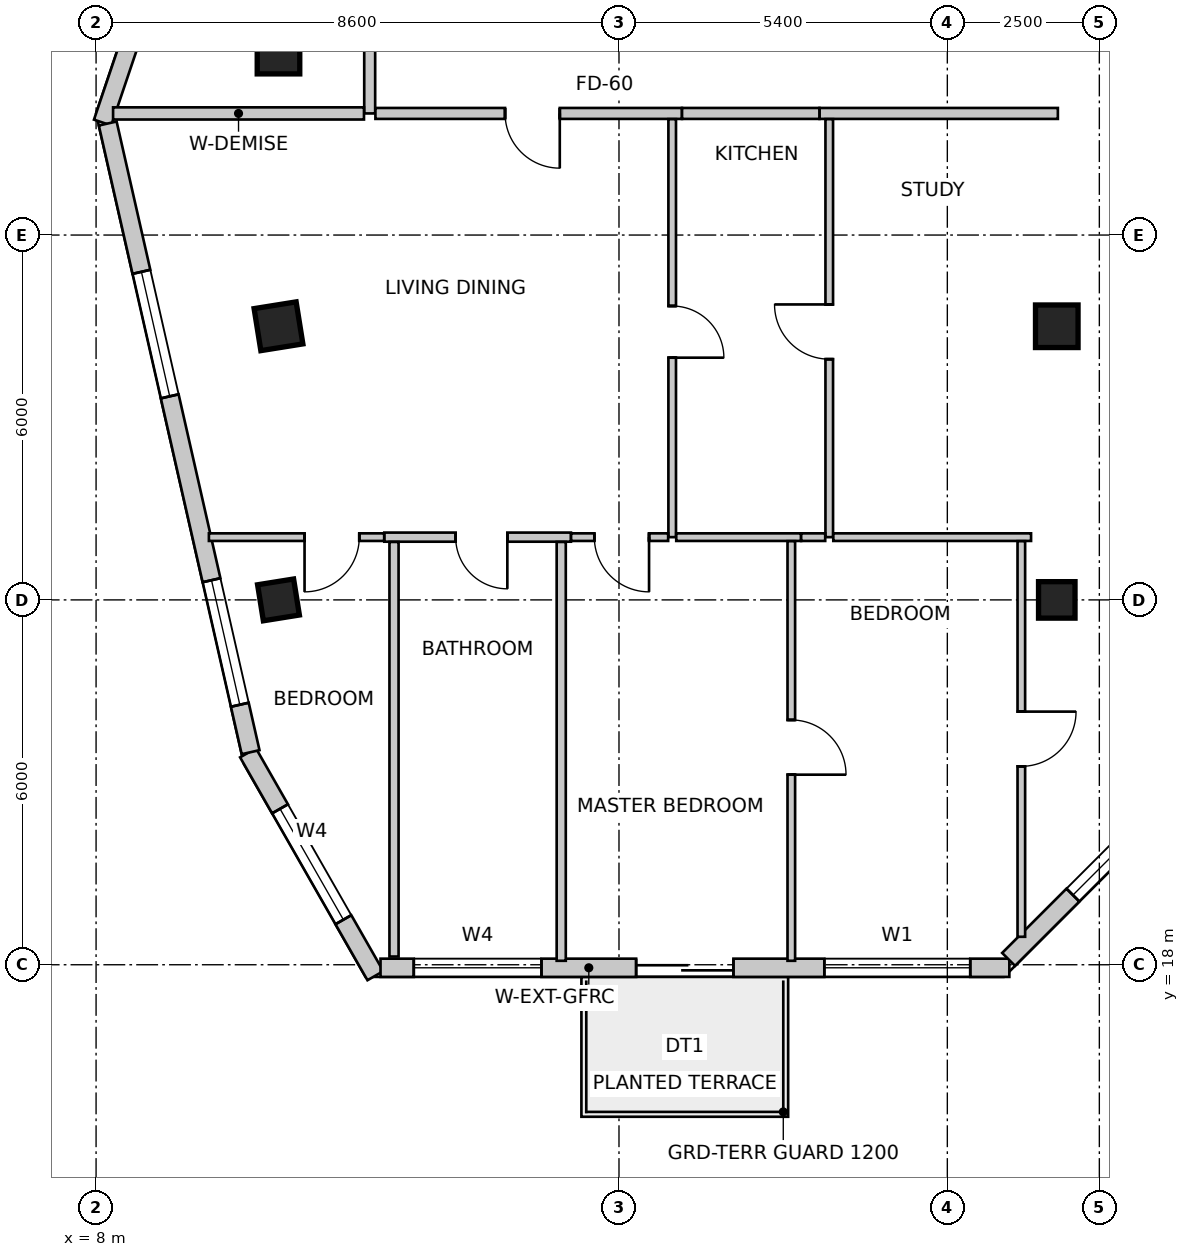
"""IFC4 building model, lengths in metres.
Left out: names, types, materials, properties, quantities, classifications, styles, units other than length and angle.
Written with IfcOpenShell. Run it as: python <this file> out.ifc"""

import sys

from ifc_helpers import new_model, si_unit, direction, frame, frame_2d, origin, origin_2d, place, context, subcontext, project, spatial, rectangle, extrude, source, transform, mapped, element, fill, save


model = new_model("IFC4")
c1 = context("Model", 3, precision=1e-05, world=origin(), true_north=direction((0.0, 1.0)))
c2 = subcontext(c1, "Body", "Model", "MODEL_VIEW")
j1 = project(units=[si_unit("LENGTHUNIT", "METRE"), si_unit("PLANEANGLEUNIT", "RADIAN")], contexts=[c1])
p1 = place(None, origin())
s1 = spatial("IfcSite", under=j1, at=p1, CompositionType="ELEMENT")
p2 = place(p1, origin())
s2 = spatial("IfcBuilding", under=s1, at=p2, CompositionType="ELEMENT")
p3 = place(p2, frame((0.0, 0.0, 252.9)))
s3 = spatial("IfcBuildingStorey", under=s2, at=p3, CompositionType="ELEMENT", Elevation=252.9)
m1 = source(origin(), c2, "Body", "SweptSolid", [
    extrude(rectangle(XDim=0.7, YDim=0.7, at=origin_2d()), origin(), (0.0, 0.0, 1.0), 3.6),
])
for number, where, z_axis, x_axis in (
    (1, (11.0, 33.0, 0.0), (0.0, 0.0, 1.0), (1.0, 0.0, 0.0)),
    (2, (11.0, 28.5, 0.0), (0.0, 0.0, 1.0), (0.158, -0.987, 0.0)),
):
    element("IfcColumn", number, at=place(p3, frame(where, z_axis=z_axis, x_axis=x_axis)), inside=s3, PredefinedType="COLUMN", context=c2, shape_type="MappedRepresentation", body=[
        mapped(m1, transform((0.0, 0.0, 0.0), scale=1.0)),
    ])
m2 = source(origin(), c2, "Body", "SweptSolid", [
    extrude(rectangle(XDim=0.6, YDim=0.6, at=origin_2d()), origin(), (0.0, 0.0, 1.0), 3.6),
])
p4 = place(p3, frame((11.0, 24.0, 0.0), z_axis=(0.0, 0.0, 1.0), x_axis=(0.158158067254, -0.987413806751, 0.0)))
e3 = element("IfcColumn", 3, at=p4, inside=s3, PredefinedType="COLUMN", context=c2, shape_type="MappedRepresentation", body=[
    mapped(m2, transform((0.0, 0.0, 0.0), scale=1.0)),
])
p5 = place(p3, frame((23.8, 28.5, 0.0), z_axis=(0.0, 0.0, 1.0), x_axis=(1.0, 0.0, 0.0)))
e4 = element("IfcColumn", 4, at=p5, inside=s3, PredefinedType="COLUMN", context=c2, shape_type="MappedRepresentation", body=[
    mapped(m1, transform((0.0, 0.0, 0.0), scale=1.0)),
])
p6 = place(p3, frame((23.8, 24.0, 0.0), z_axis=(0.0, 0.0, 1.0), x_axis=(1.0, 0.0, 0.0)))
e5 = element("IfcColumn", 5, at=p6, inside=s3, PredefinedType="COLUMN", context=c2, shape_type="MappedRepresentation", body=[
    mapped(m2, transform((0.0, 0.0, 0.0), scale=1.0)),
])
p7 = place(p3, frame((10.499, 21.485, 0.0), z_axis=(0.0, 0.0, 1.0), x_axis=(0.496163848656, -0.868228907194, 0.0)))
e6 = element("IfcWall", 6, at=p7, inside=s3, PredefinedType="SOLIDWALL", context=c2, shape_type="SweptSolid", body=[
    extrude(rectangle(XDim=4.222, YDim=0.3, at=frame_2d((2.111, 0.0))), origin(), (0.0, 0.0, 1.0), 3.35),
])
m3 = source(origin(), c2, "Body", "SweptSolid", [
    extrude(rectangle(XDim=2.1, YDim=2.0, at=frame_2d((1.05, 1.0))), frame((0.0, 0.16, 0.0), z_axis=(0.0, -1.0, 0.0), x_axis=(1.0, 0.0, 0.0)), (0.0, 0.0, 1.0), 0.32),
])
p8 = place(p7, frame((1.061, 0.0, 0.85)))
e7 = element("IfcOpeningElement", 7, at=p8, cuts=e6, PredefinedType="OPENING", context=c2, shape_type="MappedRepresentation", body=[
    mapped(m3, transform((0.0, 0.0, 0.0), scale=1.0)),
])
p9 = place(p3, frame((12.678, 17.95, 0.0), z_axis=(0.0, 0.0, 1.0), x_axis=(1.0, 0.0, 0.0)))
e8 = element("IfcWall", 8, at=p9, inside=s3, PredefinedType="SOLIDWALL", context=c2, shape_type="SweptSolid", body=[
    extrude(rectangle(XDim=10.342, YDim=0.3, at=frame_2d((5.171, 0.0))), origin(), (0.0, 0.0, 1.0), 3.35),
])
m4 = source(origin(), c2, "Body", "SweptSolid", [
    extrude(rectangle(XDim=1.6, YDim=2.15, at=frame_2d((0.8, 1.075))), frame((0.0, 0.16, 0.0), z_axis=(0.0, -1.0, 0.0), x_axis=(1.0, 0.0, 0.0)), (0.0, 0.0, 1.0), 0.32),
])
p10 = place(p9, frame((4.204, 0.0, 0.0)))
e9 = element("IfcOpeningElement", 9, at=p10, cuts=e8, PredefinedType="OPENING", context=c2, shape_type="MappedRepresentation", body=[
    mapped(m4, transform((0.0, 0.0, 0.0), scale=1.0)),
])
p11 = place(p9, frame((0.547, 0.0, 0.85)))
e10 = element("IfcOpeningElement", 10, at=p11, cuts=e8, PredefinedType="OPENING", context=c2, shape_type="MappedRepresentation", body=[
    mapped(m3, transform((0.0, 0.0, 0.0), scale=1.0)),
])
m5 = source(origin(), c2, "Body", "SweptSolid", [
    extrude(rectangle(XDim=2.4, YDim=2.2, at=frame_2d((1.2, 1.1))), frame((0.0, 0.16, 0.0), z_axis=(0.0, -1.0, 0.0), x_axis=(1.0, 0.0, 0.0)), (0.0, 0.0, 1.0), 0.32),
])
p12 = place(p9, frame((7.299, 0.0, 0.85)))
e11 = element("IfcOpeningElement", 11, at=p12, cuts=e8, PredefinedType="OPENING", context=c2, shape_type="MappedRepresentation", body=[
    mapped(m5, transform((0.0, 0.0, 0.0), scale=1.0)),
])
p13 = place(p3, frame((23.008, 18.088, 0.0), z_axis=(0.0, 0.0, 1.0), x_axis=(0.707106781187, 0.707106781187, 0.0)))
e12 = element("IfcWall", 12, at=p13, inside=s3, PredefinedType="SOLIDWALL", context=c2, shape_type="SweptSolid", body=[
    extrude(rectangle(XDim=4.781, YDim=0.3, at=frame_2d((2.39, 0.0))), origin(), (0.0, 0.0, 1.0), 3.35),
])
p14 = place(p13, frame((1.496, 0.0, 0.85)))
e13 = element("IfcOpeningElement", 13, at=p14, cuts=e12, PredefinedType="OPENING", context=c2, shape_type="MappedRepresentation", body=[
    mapped(m3, transform((0.0, 0.0, 0.0), scale=1.0)),
])
p15 = place(p3, frame((13.269, 47.134, 0.0), z_axis=(0.0, 0.0, 1.0), x_axis=(-0.3199211297, -0.947444178182, 0.0)))
e14 = element("IfcWall", 14, at=p15, inside=s3, PredefinedType="SOLIDWALL", context=c2, shape_type="SweptSolid", body=[
    extrude(rectangle(XDim=16.132, YDim=0.3, at=frame_2d((8.066, 0.0))), origin(), (0.0, 0.0, 1.0), 3.35),
])
p16 = place(p15, frame((2.435, 0.0, 0.85)))
e15 = element("IfcOpeningElement", 15, at=p16, cuts=e14, PredefinedType="OPENING", context=c2, shape_type="MappedRepresentation", body=[
    mapped(m5, transform((0.0, 0.0, 0.0), scale=1.0)),
])
p17 = place(p15, frame((7.417, 0.0, 0.85)))
e16 = element("IfcOpeningElement", 16, at=p17, cuts=e14, PredefinedType="OPENING", context=c2, shape_type="MappedRepresentation", body=[
    mapped(m3, transform((0.0, 0.0, 0.0), scale=1.0)),
])
p18 = place(p15, frame((12.099, 0.0, 0.85)))
e17 = element("IfcOpeningElement", 17, at=p18, cuts=e14, PredefinedType="OPENING", context=c2, shape_type="MappedRepresentation", body=[
    mapped(m5, transform((0.0, 0.0, 0.0), scale=1.0)),
])
p19 = place(p3, frame((8.191, 31.834, 0.0), z_axis=(0.0, 0.0, 1.0), x_axis=(0.221636032737, -0.975129462683, 0.0)))
e18 = element("IfcWall", 18, at=p19, inside=s3, PredefinedType="SOLIDWALL", context=c2, shape_type="SweptSolid", body=[
    extrude(rectangle(XDim=10.602, YDim=0.3, at=frame_2d((5.301, 0.0))), origin(), (0.0, 0.0, 1.0), 3.35),
])
p20 = place(p19, frame((2.501, 0.0, 0.85)))
e19 = element("IfcOpeningElement", 19, at=p20, cuts=e18, PredefinedType="OPENING", context=c2, shape_type="MappedRepresentation", body=[
    mapped(m3, transform((0.0, 0.0, 0.0), scale=1.0)),
])
p21 = place(p19, frame((7.702, 0.0, 0.85)))
e20 = element("IfcOpeningElement", 20, at=p21, cuts=e18, PredefinedType="OPENING", context=c2, shape_type="MappedRepresentation", body=[
    mapped(m3, transform((0.0, 0.0, 0.0), scale=1.0)),
])
p22 = place(p3, frame((12.5, 32.0, 0.0), z_axis=(0.0, 0.0, 1.0), x_axis=(0.0, 1.0, 0.0)))
e21 = element("IfcWall", 21, at=p22, inside=s3, PredefinedType="PARTITIONING", context=c2, shape_type="SweptSolid", body=[
    extrude(rectangle(XDim=1.556, YDim=0.18, at=frame_2d((0.778, 0.0))), origin(), (0.0, 0.0, 1.0), 3.019),
])
p23 = place(p3, frame((23.818, 32.0, 0.0), z_axis=(0.0, 0.0, 1.0), x_axis=(-1.0, 0.0, 0.0)))
e22 = element("IfcWall", 22, at=p23, inside=s3, PredefinedType="PARTITIONING", context=c2, shape_type="SweptSolid", body=[
    extrude(rectangle(XDim=3.92, YDim=0.18, at=frame_2d((1.96, 0.0))), origin(), (0.0, 0.0, 1.0), 3.019),
])
p24 = place(p3, frame((17.635, 32.0, 0.0), z_axis=(0.0, 0.0, 1.0), x_axis=(-1.0, 0.0, 0.0)))
e23 = element("IfcWall", 23, at=p24, inside=s3, PredefinedType="PARTITIONING", context=c2, shape_type="SweptSolid", body=[
    extrude(rectangle(XDim=5.041, YDim=0.18, at=frame_2d((2.521, 0.0))), origin(), (0.0, 0.0, 1.0), 3.019),
])
m6 = source(origin(), c2, "Body", "SweptSolid", [
    extrude(rectangle(XDim=0.9, YDim=2.15, at=frame_2d((0.45, 1.075))), frame((0.0, 0.1, 0.0), z_axis=(0.0, -1.0, 0.0), x_axis=(1.0, 0.0, 0.0)), (0.0, 0.0, 1.0), 0.2),
])
p25 = place(p24, frame((2.009, 0.0, 0.0)))
e24 = element("IfcOpeningElement", 24, at=p25, cuts=e23, PredefinedType="OPENING", context=c2, shape_type="MappedRepresentation", body=[
    mapped(m6, transform((0.0, 0.0, 0.0), scale=1.0)),
])
p26 = place(p3, frame((19.896, 32.0, 0.0), z_axis=(0.0, 0.0, 1.0), x_axis=(-1.0, 0.0, 0.0)))
e25 = element("IfcWall", 25, at=p26, inside=s3, PredefinedType="PARTITIONING", context=c2, shape_type="SweptSolid", body=[
    extrude(rectangle(XDim=2.259, YDim=0.18, at=frame_2d((1.129, 0.0))), origin(), (0.0, 0.0, 1.0), 3.35),
])
p27 = place(p3, frame((12.406, 32.0, 0.0), z_axis=(0.0, 0.0, 1.0), x_axis=(-1.0, 0.0, 0.0)))
e26 = element("IfcWall", 26, at=p27, inside=s3, PredefinedType="PARTITIONING", context=c2, shape_type="SweptSolid", body=[
    extrude(rectangle(XDim=4.126, YDim=0.2, at=frame_2d((2.063, 0.0))), origin(), (0.0, 0.0, 1.0), 2.642),
])
p28 = place(p3, frame((20.058, 25.032, 0.0), z_axis=(0.0, 0.0, 1.0), x_axis=(0.0, 1.0, 0.0)))
e27 = element("IfcWall", 27, at=p28, inside=s3, PredefinedType="PARTITIONING", context=c2, shape_type="SweptSolid", body=[
    extrude(rectangle(XDim=6.874, YDim=0.125, at=frame_2d((3.437, 0.0))), origin(), (0.0, 0.0, 1.0), 2.879),
])
m7 = source(origin(), c2, "Body", "SweptSolid", [
    extrude(rectangle(XDim=0.9, YDim=2.15, at=frame_2d((0.45, 1.075))), frame((0.0, 0.073, 0.0), z_axis=(0.0, -1.0, 0.0), x_axis=(1.0, 0.0, 0.0)), (0.0, 0.0, 1.0), 0.145),
])
p29 = place(p28, frame((2.927, 0.0, 0.0)))
e28 = element("IfcOpeningElement", 28, at=p29, cuts=e27, PredefinedType="OPENING", context=c2, shape_type="MappedRepresentation", body=[
    mapped(m7, transform((0.0, 0.0, 0.0), scale=1.0)),
])
p30 = place(p3, frame((23.377, 25.032, 0.0), z_axis=(0.0, 0.0, 1.0), x_axis=(-1.0, 0.0, 0.0)))
e29 = element("IfcWall", 29, at=p30, inside=s3, PredefinedType="PARTITIONING", context=c2, shape_type="SweptSolid", body=[
    extrude(rectangle(XDim=3.252, YDim=0.125, at=frame_2d((1.626, 0.0))), origin(), (0.0, 0.0, 1.0), 3.019),
])
p31 = place(p3, frame((17.475, 31.906, 0.0), z_axis=(0.0, 0.0, 1.0), x_axis=(0.0, -1.0, 0.0)))
e30 = element("IfcWall", 30, at=p31, inside=s3, PredefinedType="PARTITIONING", context=c2, shape_type="SweptSolid", body=[
    extrude(rectangle(XDim=6.874, YDim=0.125, at=frame_2d((3.437, 0.0))), origin(), (0.0, 0.0, 1.0), 2.879),
])
m8 = source(origin(), c2, "Body", "SweptSolid", [
    extrude(rectangle(XDim=0.85, YDim=2.15, at=frame_2d((0.425, 1.075))), frame((0.0, 0.073, 0.0), z_axis=(0.0, -1.0, 0.0), x_axis=(1.0, 0.0, 0.0)), (0.0, 0.0, 1.0), 0.145),
])
p32 = place(p31, frame((3.073, 0.0, 0.0)))
e31 = element("IfcOpeningElement", 31, at=p32, cuts=e30, PredefinedType="OPENING", context=c2, shape_type="MappedRepresentation", body=[
    mapped(m8, transform((0.0, 0.0, 0.0), scale=1.0)),
])
p33 = place(p3, frame((15.81, 25.032, 0.0), z_axis=(0.0, 0.0, 1.0), x_axis=(-1.0, 0.0, 0.0)))
e32 = element("IfcWall", 32, at=p33, inside=s3, PredefinedType="PARTITIONING", context=c2, shape_type="SweptSolid", body=[
    extrude(rectangle(XDim=3.07, YDim=0.15, at=frame_2d((1.535, 0.0))), origin(), (0.0, 0.0, 1.0), 2.879),
])
m9 = source(origin(), c2, "Body", "SweptSolid", [
    extrude(rectangle(XDim=0.85, YDim=2.15, at=frame_2d((0.425, 1.075))), frame((0.0, 0.085, 0.0), z_axis=(0.0, -1.0, 0.0), x_axis=(1.0, 0.0, 0.0)), (0.0, 0.0, 1.0), 0.17),
])
p34 = place(p33, frame((1.046, 0.0, 0.0)))
e33 = element("IfcOpeningElement", 33, at=p34, cuts=e32, PredefinedType="OPENING", context=c2, shape_type="MappedRepresentation", body=[
    mapped(m9, transform((0.0, 0.0, 0.0), scale=1.0)),
])
p35 = place(p3, frame((12.738, 25.032, 0.0), z_axis=(0.0, 0.0, 1.0), x_axis=(-1.0, 0.0, 0.0)))
e34 = element("IfcWall", 34, at=p35, inside=s3, PredefinedType="PARTITIONING", context=c2, shape_type="SweptSolid", body=[
    extrude(rectangle(XDim=2.883, YDim=0.125, at=frame_2d((1.441, 0.0))), origin(), (0.0, 0.0, 1.0), 2.642),
])
p36 = place(p35, frame((0.409, 0.0, 0.0)))
e35 = element("IfcOpeningElement", 35, at=p36, cuts=e34, PredefinedType="OPENING", context=c2, shape_type="MappedRepresentation", body=[
    mapped(m7, transform((0.0, 0.0, 0.0), scale=1.0)),
])
p37 = place(p3, frame((17.408, 25.032, 0.0), z_axis=(0.0, 0.0, 1.0), x_axis=(-1.0, 0.0, 0.0)))
e36 = element("IfcWall", 36, at=p37, inside=s3, PredefinedType="PARTITIONING", context=c2, shape_type="SweptSolid", body=[
    extrude(rectangle(XDim=1.596, YDim=0.125, at=frame_2d((0.798, 0.0))), origin(), (0.0, 0.0, 1.0), 3.35),
])
p38 = place(p37, frame((0.314, 0.0, 0.0)))
e37 = element("IfcOpeningElement", 37, at=p38, cuts=e36, PredefinedType="OPENING", context=c2, shape_type="MappedRepresentation", body=[
    mapped(m7, transform((0.0, 0.0, 0.0), scale=1.0)),
])
p39 = place(p3, frame((19.594, 25.032, 0.0), z_axis=(0.0, 0.0, 1.0), x_axis=(-1.0, 0.0, 0.0)))
e38 = element("IfcWall", 38, at=p39, inside=s3, PredefinedType="PARTITIONING", context=c2, shape_type="SweptSolid", body=[
    extrude(rectangle(XDim=2.052, YDim=0.125, at=frame_2d((1.026, 0.0))), origin(), (0.0, 0.0, 1.0), 3.35),
])
p40 = place(p3, frame((19.991, 25.032, 0.0), z_axis=(0.0, 0.0, 1.0), x_axis=(-1.0, 0.0, 0.0)))
e39 = element("IfcWall", 39, at=p40, inside=s3, PredefinedType="PARTITIONING", context=c2, shape_type="SweptSolid", body=[
    extrude(rectangle(XDim=0.396, YDim=0.125, at=frame_2d((0.198, 0.0))), origin(), (0.0, 0.0, 1.0), 3.35),
])
p41 = place(p3, frame((12.9, 18.135, 0.0), z_axis=(0.0, 0.0, 1.0), x_axis=(0.0, 1.0, 0.0)))
e40 = element("IfcWall", 40, at=p41, inside=s3, PredefinedType="PARTITIONING", context=c2, shape_type="SweptSolid", body=[
    extrude(rectangle(XDim=6.818, YDim=0.15, at=frame_2d((3.409, 0.0))), origin(), (0.0, 0.0, 1.0), 2.879),
])
p42 = place(p3, frame((15.65, 24.953, 0.0), z_axis=(0.0, 0.0, 1.0), x_axis=(0.0, -1.0, 0.0)))
e41 = element("IfcWall", 41, at=p42, inside=s3, PredefinedType="PARTITIONING", context=c2, shape_type="SweptSolid", body=[
    extrude(rectangle(XDim=6.888, YDim=0.15, at=frame_2d((3.444, 0.0))), origin(), (0.0, 0.0, 1.0), 2.979),
])
p43 = place(p3, frame((19.434, 24.966, 0.0), z_axis=(0.0, 0.0, 1.0), x_axis=(0.0, -1.0, 0.0)))
e42 = element("IfcWall", 42, at=p43, inside=s3, PredefinedType="PARTITIONING", context=c2, shape_type="SweptSolid", body=[
    extrude(rectangle(XDim=6.901, YDim=0.125, at=frame_2d((3.45, 0.0))), origin(), (0.0, 0.0, 1.0), 2.979),
])
p44 = place(p43, frame((2.94, 0.0, 0.0)))
e43 = element("IfcOpeningElement", 43, at=p44, cuts=e42, PredefinedType="OPENING", context=c2, shape_type="MappedRepresentation", body=[
    mapped(m7, transform((0.0, 0.0, 0.0), scale=1.0)),
])
p45 = place(p3, frame((23.217, 24.966, 0.0), z_axis=(0.0, 0.0, 1.0), x_axis=(0.0, -1.0, 0.0)))
e44 = element("IfcWall", 44, at=p45, inside=s3, PredefinedType="PARTITIONING", context=c2, shape_type="SweptSolid", body=[
    extrude(rectangle(XDim=6.506, YDim=0.125, at=frame_2d((3.253, 0.0))), origin(), (0.0, 0.0, 1.0), 2.979),
])
p46 = place(p45, frame((2.803, 0.0, 0.0)))
e45 = element("IfcOpeningElement", 45, at=p46, cuts=e44, PredefinedType="OPENING", context=c2, shape_type="MappedRepresentation", body=[
    mapped(m7, transform((0.0, 0.0, 0.0), scale=1.0)),
])
m10 = source(origin(), c2, "Body", "SweptSolid", [
    extrude(rectangle(XDim=2.1, YDim=2.0, at=frame_2d((1.05, 1.0))), frame((0.0, -0.015, 0.0), z_axis=(0.0, -1.0, 0.0), x_axis=(1.0, 0.0, 0.0)), (0.0, 0.0, 1.0), 0.06),
])
p47 = place(p8, origin())
e46 = element("IfcWindow", 46, at=p47, inside=s3, PartitioningType="SINGLE_PANEL", PredefinedType="WINDOW", context=c2, shape_type="MappedRepresentation", body=[
    mapped(m10, transform((0.0, 0.0, 0.0), scale=1.0)),
])
fill(e7, e46)
m11 = source(origin(), c2, "Body", "SweptSolid", [
    extrude(rectangle(XDim=1.6, YDim=2.15, at=frame_2d((0.8, 1.075))), frame((0.0, 0.025, 0.0), z_axis=(0.0, -1.0, 0.0), x_axis=(1.0, 0.0, 0.0)), (0.0, 0.0, 1.0), 0.05),
])
p48 = place(p10, origin())
e47 = element("IfcDoor", 47, at=p48, inside=s3, OperationType="DOUBLE_DOOR_SLIDING", PredefinedType="DOOR", context=c2, shape_type="MappedRepresentation", body=[
    mapped(m11, transform((0.0, 0.0, 0.0), scale=1.0)),
])
fill(e9, e47)
p49 = place(p11, origin())
e48 = element("IfcWindow", 48, at=p49, inside=s3, PartitioningType="SINGLE_PANEL", PredefinedType="WINDOW", context=c2, shape_type="MappedRepresentation", body=[
    mapped(m10, transform((0.0, 0.0, 0.0), scale=1.0)),
])
fill(e10, e48)
m12 = source(origin(), c2, "Body", "SweptSolid", [
    extrude(rectangle(XDim=2.4, YDim=2.2, at=frame_2d((1.2, 1.1))), frame((0.0, -0.015, 0.0), z_axis=(0.0, -1.0, 0.0), x_axis=(1.0, 0.0, 0.0)), (0.0, 0.0, 1.0), 0.06),
])
p50 = place(p12, origin())
e49 = element("IfcWindow", 49, at=p50, inside=s3, PartitioningType="SINGLE_PANEL", PredefinedType="WINDOW", context=c2, shape_type="MappedRepresentation", body=[
    mapped(m12, transform((0.0, 0.0, 0.0), scale=1.0)),
])
fill(e11, e49)
p51 = place(p14, origin())
e50 = element("IfcWindow", 50, at=p51, inside=s3, PartitioningType="SINGLE_PANEL", PredefinedType="WINDOW", context=c2, shape_type="MappedRepresentation", body=[
    mapped(m10, transform((0.0, 0.0, 0.0), scale=1.0)),
])
fill(e13, e50)
p52 = place(p20, origin())
e51 = element("IfcWindow", 51, at=p52, inside=s3, PartitioningType="SINGLE_PANEL", PredefinedType="WINDOW", context=c2, shape_type="MappedRepresentation", body=[
    mapped(m10, transform((0.0, 0.0, 0.0), scale=1.0)),
])
fill(e19, e51)
p53 = place(p21, origin())
e52 = element("IfcWindow", 52, at=p53, inside=s3, PartitioningType="SINGLE_PANEL", PredefinedType="WINDOW", context=c2, shape_type="MappedRepresentation", body=[
    mapped(m10, transform((0.0, 0.0, 0.0), scale=1.0)),
])
fill(e20, e52)
m13 = source(origin(), c2, "Body", "SweptSolid", [
    extrude(rectangle(XDim=0.9, YDim=2.15, at=frame_2d((0.45, 1.075))), frame((0.0, 0.025, 0.0), z_axis=(0.0, -1.0, 0.0), x_axis=(1.0, 0.0, 0.0)), (0.0, 0.0, 1.0), 0.05),
])
p54 = place(p29, origin())
e53 = element("IfcDoor", 53, at=p54, inside=s3, OperationType="SINGLE_SWING_RIGHT", PredefinedType="DOOR", context=c2, shape_type="MappedRepresentation", body=[
    mapped(m13, transform((0.0, 0.0, 0.0), scale=1.0)),
])
fill(e28, e53)
m14 = source(origin(), c2, "Body", "SweptSolid", [
    extrude(rectangle(XDim=0.9, YDim=2.15, at=frame_2d((0.45, 1.075))), frame((0.0, 0.025, 0.0), z_axis=(0.0, -1.0, 0.0), x_axis=(1.0, 0.0, 0.0)), (0.0, 0.0, 1.0), 0.05),
])
p55 = place(p25, origin())
e54 = element("IfcDoor", 54, at=p55, inside=s3, OperationType="SINGLE_SWING_LEFT", PredefinedType="DOOR", context=c2, shape_type="MappedRepresentation", body=[
    mapped(m14, transform((0.0, 0.0, 0.0), scale=1.0)),
])
fill(e24, e54)
m15 = source(origin(), c2, "Body", "SweptSolid", [
    extrude(rectangle(XDim=0.85, YDim=2.15, at=frame_2d((0.425, 1.075))), frame((0.0, 0.025, 0.0), z_axis=(0.0, -1.0, 0.0), x_axis=(1.0, 0.0, 0.0)), (0.0, 0.0, 1.0), 0.05),
])
p56 = place(p32, origin())
e55 = element("IfcDoor", 55, at=p56, inside=s3, OperationType="SINGLE_SWING_RIGHT", PredefinedType="DOOR", context=c2, shape_type="MappedRepresentation", body=[
    mapped(m15, transform((0.0, 0.0, 0.0), scale=1.0)),
])
fill(e31, e55)
p57 = place(p34, origin())
e56 = element("IfcDoor", 56, at=p57, inside=s3, OperationType="SINGLE_SWING_LEFT", PredefinedType="DOOR", context=c2, shape_type="MappedRepresentation", body=[
    mapped(m15, transform((0.0, 0.0, 0.0), scale=1.0)),
])
fill(e33, e56)
p58 = place(p36, origin())
e57 = element("IfcDoor", 57, at=p58, inside=s3, OperationType="SINGLE_SWING_RIGHT", PredefinedType="DOOR", context=c2, shape_type="MappedRepresentation", body=[
    mapped(m13, transform((0.0, 0.0, 0.0), scale=1.0)),
])
fill(e35, e57)
p59 = place(p38, origin())
e58 = element("IfcDoor", 58, at=p59, inside=s3, OperationType="SINGLE_SWING_LEFT", PredefinedType="DOOR", context=c2, shape_type="MappedRepresentation", body=[
    mapped(m13, transform((0.0, 0.0, 0.0), scale=1.0)),
])
fill(e37, e58)
p60 = place(p44, origin())
e59 = element("IfcDoor", 59, at=p60, inside=s3, OperationType="SINGLE_SWING_RIGHT", PredefinedType="DOOR", context=c2, shape_type="MappedRepresentation", body=[
    mapped(m13, transform((0.0, 0.0, 0.0), scale=1.0)),
])
fill(e43, e59)
p61 = place(p46, origin())
e60 = element("IfcDoor", 60, at=p61, inside=s3, OperationType="SINGLE_SWING_LEFT", PredefinedType="DOOR", context=c2, shape_type="MappedRepresentation", body=[
    mapped(m13, transform((0.0, 0.0, 0.0), scale=1.0)),
])
fill(e45, e60)
save(model, sys.argv[1])
